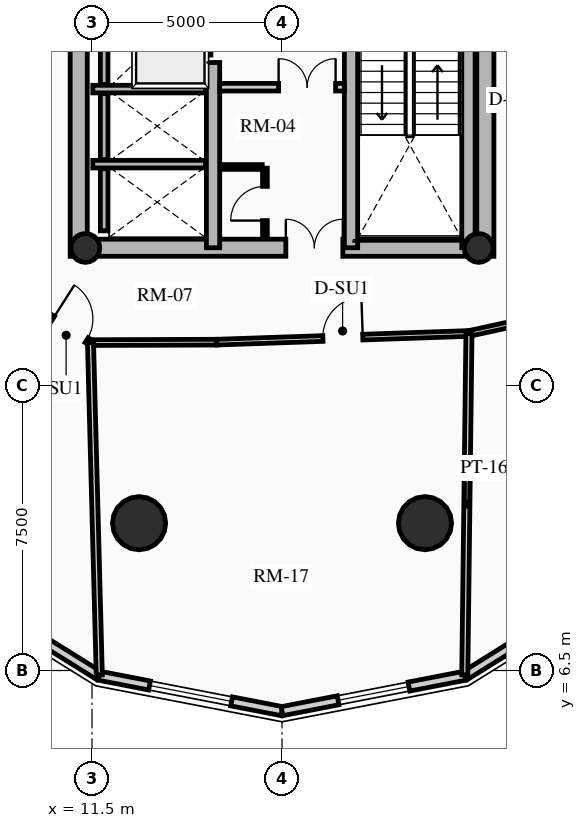
"""IFC4 building model, lengths in metres.
Left out: names, types, materials, properties, quantities, classifications, styles, units other than length and angle.
Written with IfcOpenShell. Run it as: python <this file> out.ifc"""

import sys

from ifc_helpers import new_model, si_unit, direction, frame, frame_2d, origin, origin_2d, place, context, subcontext, project, spatial, rectangle, circle, hollow_circle, extrude, source, transform, mapped, element, fill, save


model = new_model("IFC4")
c1 = context("Model", 3, precision=1e-05, world=origin(), true_north=direction((0.0, 1.0)))
c2 = subcontext(c1, "Body", "Model", "MODEL_VIEW")
j1 = project(units=[si_unit("LENGTHUNIT", "METRE"), si_unit("PLANEANGLEUNIT", "RADIAN")], contexts=[c1])
p1 = place(None, origin())
s1 = spatial("IfcSite", under=j1, at=p1, CompositionType="ELEMENT")
p2 = place(p1, origin())
s2 = spatial("IfcBuilding", under=s1, at=p2, CompositionType="ELEMENT")
p3 = place(p2, frame((0.0, 0.0, 81.79)))
s3 = spatial("IfcBuildingStorey", under=s2, at=p3, CompositionType="ELEMENT", Elevation=81.79)
for number, where, z_axis, x_axis in (
    (1, (11.15, 17.4, 0.0), (0.0, 0.0, 1.0), (0.0, 1.0, 0.0)),
    (2, (21.85, 17.4, 0.0), (0.0, 0.0, 1.0), (0.0, 1.0, 0.0)),
):
    element("IfcWall", number, at=place(p3, frame(where, z_axis=z_axis, x_axis=x_axis)), inside=s3, PredefinedType="SHEAR", context=c2, shape_type="SweptSolid", body=[
        extrude(rectangle(XDim=14.2, YDim=0.45, at=frame_2d((7.1, 0.0))), origin(), (0.0, 0.0, 1.0), 2.91),
    ])
p4 = place(p3, frame((11.15, 17.625, 0.0), z_axis=(0.0, 0.0, 1.0), x_axis=(1.0, 0.0, 0.0)))
e3 = element("IfcWall", 3, at=p4, inside=s3, PredefinedType="SHEAR", context=c2, shape_type="SweptSolid", body=[
    extrude(rectangle(XDim=10.7, YDim=0.45, at=frame_2d((5.35, 0.0))), origin(), (0.0, 0.0, 1.0), 2.91),
])
m1 = source(origin(), c2, "Body", "SweptSolid", [
    extrude(rectangle(XDim=1.5, YDim=2.02, at=frame_2d((0.75, 1.01))), frame((0.0, 0.235, 0.0), z_axis=(0.0, -1.0, 0.0), x_axis=(1.0, 0.0, 0.0)), (0.0, 0.0, 1.0), 0.47),
])
p5 = place(p4, frame((5.45, 0.0, 0.0)))
e4 = element("IfcOpeningElement", 4, at=p5, cuts=e3, PredefinedType="OPENING", context=c2, shape_type="MappedRepresentation", body=[
    mapped(m1, transform((0.0, 0.0, 0.0), x_axis=(1.0, 0.0, 0.0), y_axis=(0.0, 1.0, 0.0), z_axis=(0.0, 0.0, 1.0), scale=1.0)),
])
p6 = place(p3, frame((14.685, 17.625, 0.0), z_axis=(0.0, 0.0, 1.0), x_axis=(0.0, 1.0, 0.0)))
e5 = element("IfcWall", 5, at=p6, inside=s3, PredefinedType="SHEAR", context=c2, shape_type="SweptSolid", body=[
    extrude(rectangle(XDim=13.75, YDim=0.35, at=frame_2d((6.875, 0.0))), origin(), (0.0, 0.0, 1.0), 2.91),
])
m2 = source(origin(), c2, "Body", "SweptSolid", [
    extrude(rectangle(XDim=1.1, YDim=2.015, at=frame_2d((0.55, 1.007))), frame((0.0, 0.185, 0.0), z_axis=(0.0, -1.0, 0.0), x_axis=(1.0, 0.0, 0.0)), (0.0, 0.0, 1.0), 0.37),
])
p7 = place(p6, frame((4.875, 0.0, 0.0)))
e6 = element("IfcOpeningElement", 6, at=p7, cuts=e5, PredefinedType="OPENING", context=c2, shape_type="MappedRepresentation", body=[
    mapped(m2, transform((0.0, 0.0, 0.0), x_axis=(1.0, 0.0, 0.0), y_axis=(0.0, 1.0, 0.0), z_axis=(0.0, 0.0, 1.0), scale=1.0)),
])
m3 = source(origin(), c2, "Body", "SweptSolid", [
    extrude(rectangle(XDim=1.15, YDim=2.02, at=frame_2d((0.575, 1.01))), frame((0.0, 0.185, 0.0), z_axis=(0.0, -1.0, 0.0), x_axis=(1.0, 0.0, 0.0)), (0.0, 0.0, 1.0), 0.37),
])
p8 = place(p6, frame((7.295, 0.0, 0.0)))
e7 = element("IfcOpeningElement", 7, at=p8, cuts=e5, PredefinedType="OPENING", context=c2, shape_type="MappedRepresentation", body=[
    mapped(m3, transform((0.0, 0.0, 0.0), x_axis=(1.0, 0.0, 0.0), y_axis=(0.0, 1.0, 0.0), z_axis=(0.0, 0.0, 1.0), scale=1.0)),
])
p9 = place(p3, frame((18.315, 17.625, 0.0), z_axis=(0.0, 0.0, 1.0), x_axis=(0.0, 1.0, 0.0)))
e8 = element("IfcWall", 8, at=p9, inside=s3, PredefinedType="SHEAR", context=c2, shape_type="SweptSolid", body=[
    extrude(rectangle(XDim=13.75, YDim=0.35, at=frame_2d((6.875, 0.0))), origin(), (0.0, 0.0, 1.0), 2.91),
])
p10 = place(p9, frame((10.0, 0.0, 0.0)))
e9 = element("IfcOpeningElement", 9, at=p10, cuts=e8, PredefinedType="OPENING", context=c2, shape_type="MappedRepresentation", body=[
    mapped(m2, transform((0.0, 0.0, 0.0), x_axis=(1.0, 0.0, 0.0), y_axis=(0.0, 1.0, 0.0), z_axis=(0.0, 0.0, 1.0), scale=1.0)),
])
p11 = place(p9, frame((12.0, 0.0, 0.0)))
e10 = element("IfcOpeningElement", 10, at=p11, cuts=e8, PredefinedType="OPENING", context=c2, shape_type="MappedRepresentation", body=[
    mapped(m2, transform((0.0, 0.0, 0.0), x_axis=(1.0, 0.0, 0.0), y_axis=(0.0, 1.0, 0.0), z_axis=(0.0, 0.0, 1.0), scale=1.0)),
])
p12 = place(p9, frame((5.305, 0.0, 0.0)))
e11 = element("IfcOpeningElement", 11, at=p12, cuts=e8, PredefinedType="OPENING", context=c2, shape_type="MappedRepresentation", body=[
    mapped(m3, transform((0.0, 0.0, 0.0), x_axis=(1.0, 0.0, 0.0), y_axis=(0.0, 1.0, 0.0), z_axis=(0.0, 0.0, 1.0), scale=1.0)),
])
p13 = place(p3, frame((21.405, 17.625, 0.0), z_axis=(0.0, 0.0, 1.0), x_axis=(0.0, 1.0, 0.0)))
e12 = element("IfcWall", 12, at=p13, inside=s3, PredefinedType="SHEAR", context=c2, shape_type="SweptSolid", body=[
    extrude(rectangle(XDim=6.72, YDim=0.35, at=frame_2d((3.36, 0.0))), origin(), (0.0, 0.0, 1.0), 2.91),
])
for number, where, z_axis, x_axis in (
    (13, (11.325, 17.62, 0.0), (0.0, 0.0, 1.0), (1.0, 0.0, 0.0)),
    (14, (21.675, 17.62, 0.0), (0.0, 0.0, 1.0), (1.0, 0.0, 0.0)),
):
    element("IfcColumn", number, at=place(p3, frame(where, z_axis=z_axis, x_axis=x_axis)), inside=s3, PredefinedType="COLUMN", context=c2, shape_type="SweptSolid", body=[
        extrude(hollow_circle(Radius=0.38, WallThickness=0.032, at=origin_2d()), origin(), (0.0, 0.0, 1.0), 2.91),
    ])
for number, where, z_axis, x_axis in (
    (15, (12.739, 10.377, 0.0), (0.0, 0.0, 1.0), (1.0, 0.0, 0.0)),
    (16, (20.261, 10.377, 0.0), (0.0, 0.0, 1.0), (1.0, 0.0, 0.0)),
):
    element("IfcColumn", number, at=place(p3, frame(where, z_axis=z_axis, x_axis=x_axis)), inside=s3, PredefinedType="USERDEFINED", context=c2, shape_type="SweptSolid", body=[
        extrude(circle(Radius=0.7, at=origin_2d()), origin(), (0.0, 0.0, 1.0), 2.91),
    ])
p14 = place(p3, frame((11.685, 6.363, 0.0), z_axis=(0.0, 0.0, 1.0), x_axis=(-0.848520380187, 0.529162701263, 0.0)))
e17 = element("IfcWall", 17, at=p14, inside=s3, PredefinedType="SOLIDWALL", context=c2, shape_type="SweptSolid", body=[
    extrude(rectangle(XDim=5.119, YDim=0.24, at=frame_2d((2.56, 0.0))), origin(), (0.0, 0.0, 1.0), 2.179),
])
m4 = source(origin(), c2, "Body", "SweptSolid", [
    extrude(rectangle(XDim=1.9, YDim=1.35, at=frame_2d((0.95, 0.675))), frame((0.0, 0.13, 0.0), z_axis=(0.0, -1.0, 0.0), x_axis=(1.0, 0.0, 0.0)), (0.0, 0.0, 1.0), 0.26),
])
p15 = place(p14, frame((1.609, 0.0, 0.65)))
e18 = element("IfcOpeningElement", 18, at=p15, cuts=e17, PredefinedType="OPENING", context=c2, shape_type="MappedRepresentation", body=[
    mapped(m4, transform((0.0, 0.0, 0.0), x_axis=(1.0, 0.0, 0.0), y_axis=(0.0, 1.0, 0.0), z_axis=(0.0, 0.0, 1.0), scale=1.0)),
])
p16 = place(p3, frame((16.5, 5.43, 0.0), z_axis=(0.0, 0.0, 1.0), x_axis=(-0.981723785992, 0.190311344954, 0.0)))
e19 = element("IfcWall", 19, at=p16, inside=s3, PredefinedType="SOLIDWALL", context=c2, shape_type="SweptSolid", body=[
    extrude(rectangle(XDim=4.904, YDim=0.24, at=frame_2d((2.452, 0.0))), origin(), (0.0, 0.0, 1.0), 2.179),
])
m5 = source(origin(), c2, "Body", "SweptSolid", [
    extrude(rectangle(XDim=2.2, YDim=1.35, at=frame_2d((1.1, 0.675))), frame((0.0, 0.13, 0.0), z_axis=(0.0, -1.0, 0.0), x_axis=(1.0, 0.0, 0.0)), (0.0, 0.0, 1.0), 0.26),
])
p17 = place(p16, frame((1.352, 0.0, 0.65)))
e20 = element("IfcOpeningElement", 20, at=p17, cuts=e19, PredefinedType="OPENING", context=c2, shape_type="MappedRepresentation", body=[
    mapped(m5, transform((0.0, 0.0, 0.0), x_axis=(1.0, 0.0, 0.0), y_axis=(0.0, 1.0, 0.0), z_axis=(0.0, 0.0, 1.0), scale=1.0)),
])
p18 = place(p3, frame((21.315, 6.363, 0.0), z_axis=(0.0, 0.0, 1.0), x_axis=(-0.981723785992, -0.190311344954, 0.0)))
e21 = element("IfcWall", 21, at=p18, inside=s3, PredefinedType="SOLIDWALL", context=c2, shape_type="SweptSolid", body=[
    extrude(rectangle(XDim=4.904, YDim=0.24, at=frame_2d((2.452, 0.0))), origin(), (0.0, 0.0, 1.0), 2.179),
])
p19 = place(p18, frame((1.502, 0.0, 0.65)))
e22 = element("IfcOpeningElement", 22, at=p19, cuts=e21, PredefinedType="OPENING", context=c2, shape_type="MappedRepresentation", body=[
    mapped(m4, transform((0.0, 0.0, 0.0), x_axis=(1.0, 0.0, 0.0), y_axis=(0.0, 1.0, 0.0), z_axis=(0.0, 0.0, 1.0), scale=1.0)),
])
p20 = place(p3, frame((25.658, 9.072, 0.0), z_axis=(0.0, 0.0, 1.0), x_axis=(-0.848520380187, -0.529162701263, 0.0)))
e23 = element("IfcWall", 23, at=p20, inside=s3, PredefinedType="SOLIDWALL", context=c2, shape_type="SweptSolid", body=[
    extrude(rectangle(XDim=5.119, YDim=0.24, at=frame_2d((2.56, 0.0))), origin(), (0.0, 0.0, 1.0), 2.179),
])
p21 = place(p3, frame((11.52, 21.8, 0.0), z_axis=(0.0, 0.0, 1.0), x_axis=(1.0, 0.0, 0.0)))
e24 = element("IfcWall", 24, at=p21, inside=s3, PredefinedType="SHEAR", context=c2, shape_type="SweptSolid", body=[
    extrude(rectangle(XDim=2.97, YDim=0.2, at=frame_2d((1.485, 0.0))), origin(), (0.0, 0.0, 1.0), 2.91),
])
p22 = place(p3, frame((11.82, 21.92, 0.0), z_axis=(0.0, 0.0, 1.0), x_axis=(0.0, 1.0, 0.0)))
e25 = element("IfcWall", 25, at=p22, inside=s3, PredefinedType="SHEAR", context=c2, shape_type="SweptSolid", body=[
    extrude(rectangle(XDim=2.44, YDim=0.2, at=frame_2d((1.22, 0.0))), origin(), (0.0, 0.0, 1.0), 2.91),
])
p23 = place(p3, frame((11.52, 19.825, 0.0), z_axis=(0.0, 0.0, 1.0), x_axis=(1.0, 0.0, 0.0)))
e26 = element("IfcWall", 26, at=p23, inside=s3, PredefinedType="SHEAR", context=c2, shape_type="SweptSolid", body=[
    extrude(rectangle(XDim=2.97, YDim=0.2, at=frame_2d((1.485, 0.0))), origin(), (0.0, 0.0, 1.0), 2.91),
])
p24 = place(p3, frame((11.82, 19.945, 0.0), z_axis=(0.0, 0.0, 1.0), x_axis=(0.0, 1.0, 0.0)))
e27 = element("IfcWall", 27, at=p24, inside=s3, PredefinedType="SHEAR", context=c2, shape_type="SweptSolid", body=[
    extrude(rectangle(XDim=1.735, YDim=0.2, at=frame_2d((0.867, 0.0))), origin(), (0.0, 0.0, 1.0), 2.91),
])
p25 = place(p3, frame((11.82, 18.07, 0.0), z_axis=(0.0, 0.0, 1.0), x_axis=(0.0, 1.0, 0.0)))
e28 = element("IfcWall", 28, at=p25, inside=s3, PredefinedType="SHEAR", context=c2, shape_type="SweptSolid", body=[
    extrude(rectangle(XDim=1.635, YDim=0.2, at=frame_2d((0.817, 0.0))), origin(), (0.0, 0.0, 1.0), 2.91),
])
p26 = place(p3, frame((14.86, 21.85, 0.0), z_axis=(0.0, 0.0, 1.0), x_axis=(1.0, 0.0, 0.0)))
e29 = element("IfcWall", 29, at=p26, inside=s3, PredefinedType="PARTITIONING", context=c2, shape_type="SweptSolid", body=[
    extrude(rectangle(XDim=3.28, YDim=0.2, at=frame_2d((1.64, 0.0))), origin(), (0.0, 0.0, 1.0), 2.655),
])
m6 = source(origin(), c2, "Body", "SweptSolid", [
    extrude(rectangle(XDim=1.5, YDim=2.02, at=frame_2d((0.75, 1.01))), frame((0.0, 0.11, 0.0), z_axis=(0.0, -1.0, 0.0), x_axis=(1.0, 0.0, 0.0)), (0.0, 0.0, 1.0), 0.22),
])
p27 = place(p26, frame((1.55, 0.0, 0.0)))
e30 = element("IfcOpeningElement", 30, at=p27, cuts=e29, PredefinedType="OPENING", context=c2, shape_type="MappedRepresentation", body=[
    mapped(m6, transform((0.0, 0.0, 0.0), x_axis=(1.0, 0.0, 0.0), y_axis=(0.0, 1.0, 0.0), z_axis=(0.0, 0.0, 1.0), scale=1.0)),
])
p28 = place(p3, frame((16.05, 17.92, 0.0), z_axis=(0.0, 0.0, 1.0), x_axis=(0.0, 1.0, 0.0)))
e31 = element("IfcWall", 31, at=p28, inside=s3, PredefinedType="PARTITIONING", context=c2, shape_type="SweptSolid", body=[
    extrude(rectangle(XDim=1.8, YDim=0.125, at=frame_2d((0.9, 0.0))), origin(), (0.0, 0.0, 1.0), 2.655),
])
m7 = source(origin(), c2, "Body", "SweptSolid", [
    extrude(rectangle(XDim=0.9, YDim=2.005, at=frame_2d((0.45, 1.002))), frame((0.0, 0.073, 0.0), z_axis=(0.0, -1.0, 0.0), x_axis=(1.0, 0.0, 0.0)), (0.0, 0.0, 1.0), 0.145),
])
p29 = place(p28, frame((0.42, 0.0, 0.0)))
e32 = element("IfcOpeningElement", 32, at=p29, cuts=e31, PredefinedType="OPENING", context=c2, shape_type="MappedRepresentation", body=[
    mapped(m7, transform((0.0, 0.0, 0.0), x_axis=(1.0, 0.0, 0.0), y_axis=(0.0, 1.0, 0.0), z_axis=(0.0, 0.0, 1.0), scale=1.0)),
])
p30 = place(p3, frame((14.88, 19.75, 0.0), z_axis=(0.0, 0.0, 1.0), x_axis=(1.0, 0.0, 0.0)))
e33 = element("IfcWall", 33, at=p30, inside=s3, PredefinedType="PARTITIONING", context=c2, shape_type="SweptSolid", body=[
    extrude(rectangle(XDim=1.1, YDim=0.125, at=frame_2d((0.55, 0.0))), origin(), (0.0, 0.0, 1.0), 2.655),
])
p31 = place(p3, frame((10.115, 15.983, 0.0), z_axis=(0.0, 0.0, 1.0), x_axis=(0.843995849351, -0.536349705209, 0.0)))
e34 = element("IfcWall", 34, at=p31, inside=s3, PredefinedType="PARTITIONING", context=c2, shape_type="SweptSolid", body=[
    extrude(rectangle(XDim=1.593, YDim=0.15, at=frame_2d((0.796, 0.0))), origin(), (0.0, 0.0, 1.0), 2.225),
])
m8 = source(origin(), c2, "Body", "SweptSolid", [
    extrude(rectangle(XDim=1.05, YDim=2.015, at=frame_2d((0.525, 1.007))), frame((0.0, 0.085, 0.0), z_axis=(0.0, -1.0, 0.0), x_axis=(1.0, 0.0, 0.0)), (0.0, 0.0, 1.0), 0.17),
])
p32 = place(p31, frame((0.423, 0.0, 0.0)))
e35 = element("IfcOpeningElement", 35, at=p32, cuts=e34, PredefinedType="OPENING", context=c2, shape_type="MappedRepresentation", body=[
    mapped(m8, transform((0.0, 0.0, 0.0), x_axis=(1.0, 0.0, 0.0), y_axis=(0.0, 1.0, 0.0), z_axis=(0.0, 0.0, 1.0), scale=1.0)),
])
p33 = place(p3, frame((11.46, 15.129, 0.0), z_axis=(0.0, 0.0, 1.0), x_axis=(0.999993513287, 0.003601858435, 0.0)))
e36 = element("IfcWall", 36, at=p33, inside=s3, PredefinedType="PARTITIONING", context=c2, shape_type="SweptSolid", body=[
    extrude(rectangle(XDim=3.321, YDim=0.15, at=frame_2d((1.661, 0.0))), origin(), (0.0, 0.0, 1.0), 2.225),
])
p34 = place(p3, frame((14.781, 15.141, 0.0), z_axis=(0.0, 0.0, 1.0), x_axis=(0.999407918707, 0.034406569513, 0.0)))
e37 = element("IfcWall", 37, at=p34, inside=s3, PredefinedType="PARTITIONING", context=c2, shape_type="SweptSolid", body=[
    extrude(rectangle(XDim=6.642, YDim=0.15, at=frame_2d((3.321, 0.0))), origin(), (0.0, 0.0, 1.0), 2.225),
])
p35 = place(p34, frame((2.796, 0.0, 0.0)))
e38 = element("IfcOpeningElement", 38, at=p35, cuts=e37, PredefinedType="OPENING", context=c2, shape_type="MappedRepresentation", body=[
    mapped(m8, transform((0.0, 0.0, 0.0), x_axis=(1.0, 0.0, 0.0), y_axis=(0.0, 1.0, 0.0), z_axis=(0.0, 0.0, 1.0), scale=1.0)),
])
p36 = place(p3, frame((21.419, 15.369, 0.0), z_axis=(0.0, 0.0, 1.0), x_axis=(0.977192701953, 0.212354475464, 0.0)))
e39 = element("IfcWall", 39, at=p36, inside=s3, PredefinedType="PARTITIONING", context=c2, shape_type="SweptSolid", body=[
    extrude(rectangle(XDim=1.888, YDim=0.15, at=frame_2d((0.944, 0.0))), origin(), (0.0, 0.0, 1.0), 2.225),
])
p37 = place(p3, frame((11.46, 15.129, 0.0), z_axis=(0.0, 0.0, 1.0), x_axis=(0.026480592098, -0.999649327636, 0.0)))
e40 = element("IfcWall", 40, at=p37, inside=s3, PredefinedType="PARTITIONING", context=c2, shape_type="SweptSolid", body=[
    extrude(rectangle(XDim=8.75, YDim=0.16, at=frame_2d((4.375, 0.0))), origin(), (0.0, 0.0, 1.0), 2.179),
])
p38 = place(p3, frame((21.419, 15.369, 0.0), z_axis=(0.0, 0.0, 1.0), x_axis=(-0.012251185903, -0.999924951406, 0.0)))
e41 = element("IfcWall", 41, at=p38, inside=s3, PredefinedType="PARTITIONING", context=c2, shape_type="SweptSolid", body=[
    extrude(rectangle(XDim=8.988, YDim=0.16, at=frame_2d((4.494, 0.0))), origin(), (0.0, 0.0, 1.0), 2.179),
])
m9 = source(origin(), c2, "Body", "SweptSolid", [
    extrude(rectangle(XDim=2.2, YDim=1.35, at=frame_2d((1.1, 0.675))), frame((0.0, 0.03, 0.0), z_axis=(0.0, -1.0, 0.0), x_axis=(1.0, 0.0, 0.0)), (0.0, 0.0, 1.0), 0.06),
])
p39 = place(p17, origin())
e42 = element("IfcWindow", 42, at=p39, inside=s3, PartitioningType="DOUBLE_PANEL_VERTICAL", PredefinedType="WINDOW", context=c2, shape_type="MappedRepresentation", body=[
    mapped(m9, transform((0.0, 0.0, 0.0), x_axis=(1.0, 0.0, 0.0), y_axis=(0.0, 1.0, 0.0), z_axis=(0.0, 0.0, 1.0), scale=1.0)),
])
fill(e20, e42)
m10 = source(origin(), c2, "Body", "SweptSolid", [
    extrude(rectangle(XDim=1.9, YDim=1.35, at=frame_2d((0.95, 0.675))), frame((0.0, 0.03, 0.0), z_axis=(0.0, -1.0, 0.0), x_axis=(1.0, 0.0, 0.0)), (0.0, 0.0, 1.0), 0.06),
])
p40 = place(p19, origin())
e43 = element("IfcWindow", 43, at=p40, inside=s3, PartitioningType="DOUBLE_PANEL_VERTICAL", PredefinedType="WINDOW", context=c2, shape_type="MappedRepresentation", body=[
    mapped(m10, transform((0.0, 0.0, 0.0), x_axis=(1.0, 0.0, 0.0), y_axis=(0.0, 1.0, 0.0), z_axis=(0.0, 0.0, 1.0), scale=1.0)),
])
fill(e22, e43)
m11 = source(origin(), c2, "Body", "SweptSolid", [
    extrude(rectangle(XDim=1.1, YDim=2.015, at=frame_2d((0.55, 1.007))), frame((0.0, 0.025, 0.0), z_axis=(0.0, -1.0, 0.0), x_axis=(1.0, 0.0, 0.0)), (0.0, 0.0, 1.0), 0.05),
])
p41 = place(p7, origin())
e44 = element("IfcDoor", 44, at=p41, inside=s3, OperationType="SLIDING_TO_RIGHT", PredefinedType="DOOR", context=c2, shape_type="MappedRepresentation", body=[
    mapped(m11, transform((0.0, 0.0, 0.0), x_axis=(1.0, 0.0, 0.0), y_axis=(0.0, 1.0, 0.0), z_axis=(0.0, 0.0, 1.0), scale=1.0)),
])
fill(e6, e44)
m12 = source(origin(), c2, "Body", "SweptSolid", [
    extrude(rectangle(XDim=1.5, YDim=2.02, at=frame_2d((0.75, 1.01))), frame((0.0, 0.025, 0.0), z_axis=(0.0, -1.0, 0.0), x_axis=(1.0, 0.0, 0.0)), (0.0, 0.0, 1.0), 0.05),
])
p42 = place(p5, origin())
e45 = element("IfcDoor", 45, at=p42, inside=s3, OperationType="DOUBLE_DOOR_SINGLE_SWING", PredefinedType="DOOR", context=c2, shape_type="MappedRepresentation", body=[
    mapped(m12, transform((0.0, 0.0, 0.0), x_axis=(1.0, 0.0, 0.0), y_axis=(0.0, 1.0, 0.0), z_axis=(0.0, 0.0, 1.0), scale=1.0)),
])
fill(e4, e45)
p43 = place(p27, origin())
e46 = element("IfcDoor", 46, at=p43, inside=s3, OperationType="DOUBLE_DOOR_SINGLE_SWING", PredefinedType="DOOR", context=c2, shape_type="MappedRepresentation", body=[
    mapped(m12, transform((0.0, 0.0, 0.0), x_axis=(1.0, 0.0, 0.0), y_axis=(0.0, 1.0, 0.0), z_axis=(0.0, 0.0, 1.0), scale=1.0)),
])
fill(e30, e46)
m13 = source(origin(), c2, "Body", "SweptSolid", [
    extrude(rectangle(XDim=0.9, YDim=2.005, at=frame_2d((0.45, 1.002))), frame((0.0, 0.025, 0.0), z_axis=(0.0, -1.0, 0.0), x_axis=(1.0, 0.0, 0.0)), (0.0, 0.0, 1.0), 0.05),
])
p44 = place(p29, origin())
e47 = element("IfcDoor", 47, at=p44, inside=s3, OperationType="SINGLE_SWING_LEFT", PredefinedType="DOOR", context=c2, shape_type="MappedRepresentation", body=[
    mapped(m13, transform((0.0, 0.0, 0.0), x_axis=(1.0, 0.0, 0.0), y_axis=(0.0, 1.0, 0.0), z_axis=(0.0, 0.0, 1.0), scale=1.0)),
])
fill(e32, e47)
m14 = source(origin(), c2, "Body", "SweptSolid", [
    extrude(rectangle(XDim=1.05, YDim=2.015, at=frame_2d((0.525, 1.007))), frame((0.0, 0.025, 0.0), z_axis=(0.0, -1.0, 0.0), x_axis=(1.0, 0.0, 0.0)), (0.0, 0.0, 1.0), 0.05),
])
p45 = place(p32, origin())
e48 = element("IfcDoor", 48, at=p45, inside=s3, OperationType="SINGLE_SWING_LEFT", PredefinedType="DOOR", context=c2, shape_type="MappedRepresentation", body=[
    mapped(m14, transform((0.0, 0.0, 0.0), x_axis=(1.0, 0.0, 0.0), y_axis=(0.0, 1.0, 0.0), z_axis=(0.0, 0.0, 1.0), scale=1.0)),
])
fill(e35, e48)
p46 = place(p35, origin())
e49 = element("IfcDoor", 49, at=p46, inside=s3, OperationType="SINGLE_SWING_RIGHT", PredefinedType="DOOR", context=c2, shape_type="MappedRepresentation", body=[
    mapped(m14, transform((0.0, 0.0, 0.0), x_axis=(1.0, 0.0, 0.0), y_axis=(0.0, 1.0, 0.0), z_axis=(0.0, 0.0, 1.0), scale=1.0)),
])
fill(e38, e49)
save(model, sys.argv[1])
